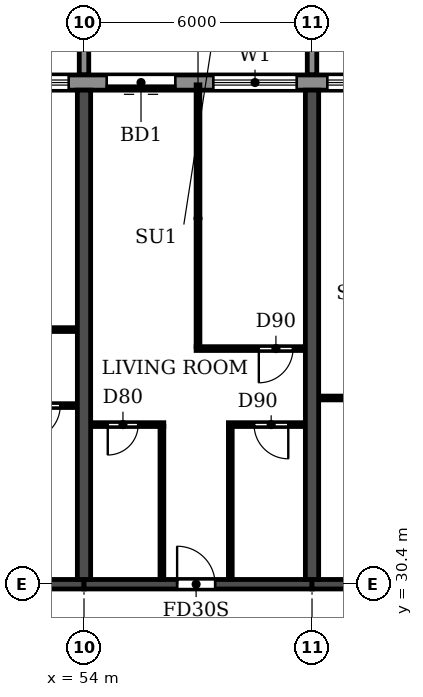
"""IFC4 building model, lengths in metres.
Left out: names, types, materials, properties, quantities, classifications, styles, units other than length and angle.
Written with IfcOpenShell. Run it as: python <this file> out.ifc"""

import sys

from ifc_helpers import new_model, si_unit, direction, frame, frame_2d, origin, place, context, subcontext, project, spatial, polyline, rectangle, outline, extrude, source, transform, mapped, element, fill, save


model = new_model("IFC4")
c1 = context("Model", 3, precision=1e-05, world=origin(), true_north=direction((0.0, 1.0)))
c2 = subcontext(c1, "Body", "Model", "MODEL_VIEW")
j1 = project(units=[si_unit("LENGTHUNIT", "METRE"), si_unit("PLANEANGLEUNIT", "RADIAN")], contexts=[c1])
p1 = place(None, origin())
s1 = spatial("IfcSite", under=j1, at=p1, CompositionType="ELEMENT")
p2 = place(p1, origin())
s2 = spatial("IfcBuilding", under=s1, at=p2, CompositionType="ELEMENT")
p3 = place(p2, frame((0.0, 0.0, 112.5)))
s3 = spatial("IfcBuildingStorey", under=s2, at=p3, CompositionType="ELEMENT", Elevation=112.5)
for number, where, z_axis, x_axis in (
    (1, (54.0, 30.525, 0.0), (0.0, 0.0, 1.0), (0.0, 1.0, 0.0)),
    (2, (60.0, 30.525, 0.0), (0.0, 0.0, 1.0), (0.0, 1.0, 0.0)),
):
    element("IfcWall", number, at=place(p3, frame(where, z_axis=z_axis, x_axis=x_axis)), inside=s3, PredefinedType="SHEAR", context=c2, shape_type="SweptSolid", body=[
        extrude(rectangle(XDim=12.875, YDim=0.35, at=frame_2d((6.438, 0.0))), origin(), (0.0, 0.0, 1.0), 2.95),
    ])
p4 = place(p3, frame((48.0, 30.4, 0.0), z_axis=(0.0, 0.0, 1.0), x_axis=(1.0, 0.0, 0.0)))
e3 = element("IfcWall", 3, at=p4, inside=s3, PredefinedType="SHEAR", context=c2, shape_type="SweptSolid", body=[
    extrude(rectangle(XDim=6.0, YDim=0.25, at=frame_2d((3.0, 0.0))), origin(), (0.0, 0.0, 1.0), 2.35),
])
p5 = place(p4, frame((2.45, 0.0, 0.0)))
e4 = element("IfcOpeningElement", 4, at=p5, cuts=e3, PredefinedType="OPENING", context=c2, shape_type="SweptSolid", body=[
    extrude(rectangle(XDim=1.0, YDim=2.1, at=frame_2d((0.5, 1.05))), frame((0.0, 0.135, 0.0), z_axis=(0.0, -1.0, 0.0), x_axis=(1.0, 0.0, 0.0)), (0.0, 0.0, 1.0), 0.27),
])
p6 = place(p3, frame((54.0, 30.4, 0.0), z_axis=(0.0, 0.0, 1.0), x_axis=(1.0, 0.0, 0.0)))
e5 = element("IfcWall", 5, at=p6, inside=s3, PredefinedType="SHEAR", context=c2, shape_type="SweptSolid", body=[
    extrude(rectangle(XDim=6.0, YDim=0.25, at=frame_2d((3.0, 0.0))), origin(), (0.0, 0.0, 1.0), 2.35),
])
p7 = place(p6, frame((2.45, 0.0, 0.0)))
e6 = element("IfcOpeningElement", 6, at=p7, cuts=e5, PredefinedType="OPENING", context=c2, shape_type="SweptSolid", body=[
    extrude(rectangle(XDim=1.0, YDim=2.1, at=frame_2d((0.5, 1.05))), frame((0.0, 0.135, 0.0), z_axis=(0.0, -1.0, 0.0), x_axis=(1.0, 0.0, 0.0)), (0.0, 0.0, 1.0), 0.27),
])
p8 = place(p3, frame((60.0, 30.4, 0.0), z_axis=(0.0, 0.0, 1.0), x_axis=(1.0, 0.0, 0.0)))
e7 = element("IfcWall", 7, at=p8, inside=s3, PredefinedType="SHEAR", context=c2, shape_type="SweptSolid", body=[
    extrude(rectangle(XDim=6.0, YDim=0.25, at=frame_2d((3.0, 0.0))), origin(), (0.0, 0.0, 1.0), 2.35),
])
p9 = place(p8, frame((2.45, 0.0, 0.0)))
e8 = element("IfcOpeningElement", 8, at=p9, cuts=e7, PredefinedType="OPENING", context=c2, shape_type="SweptSolid", body=[
    extrude(rectangle(XDim=1.0, YDim=2.1, at=frame_2d((0.5, 1.05))), frame((0.0, 0.135, 0.0), z_axis=(0.0, -1.0, 0.0), x_axis=(1.0, 0.0, 0.0)), (0.0, 0.0, 1.0), 0.27),
])
p10 = place(p3, frame((85.317, 43.6, 0.0), z_axis=(0.0, 0.0, 1.0), x_axis=(-1.0, 0.0, 0.0)))
e9 = element("IfcWall", 9, at=p10, inside=s3, PredefinedType="STANDARD", context=c2, shape_type="SweptSolid", body=[
    extrude(rectangle(XDim=68.634, YDim=0.4, at=frame_2d((34.317, 0.0))), origin(), (0.0, 0.0, 1.0), 2.95),
])
p11 = place(p10, frame((64.917, 0.0, 0.0)))
e10 = element("IfcOpeningElement", 10, at=p11, cuts=e9, PredefinedType="OPENING", context=c2, shape_type="SweptSolid", body=[
    extrude(rectangle(XDim=1.8, YDim=2.4, at=frame_2d((0.9, 1.2))), frame((0.0, 0.21, 0.0), z_axis=(0.0, -1.0, 0.0), x_axis=(1.0, 0.0, 0.0)), (0.0, 0.0, 1.0), 0.42),
])
p12 = place(p10, frame((61.717, 0.0, 0.9)))
e11 = element("IfcOpeningElement", 11, at=p12, cuts=e9, PredefinedType="OPENING", context=c2, shape_type="SweptSolid", body=[
    extrude(rectangle(XDim=2.2, YDim=1.5, at=frame_2d((1.1, 0.75))), frame((0.0, 0.21, 0.0), z_axis=(0.0, -1.0, 0.0), x_axis=(1.0, 0.0, 0.0)), (0.0, 0.0, 1.0), 0.42),
])
p13 = place(p10, frame((58.717, 0.0, 0.9)))
e12 = element("IfcOpeningElement", 12, at=p13, cuts=e9, PredefinedType="OPENING", context=c2, shape_type="SweptSolid", body=[
    extrude(rectangle(XDim=2.2, YDim=1.5, at=frame_2d((1.1, 0.75))), frame((0.0, 0.21, 0.0), z_axis=(0.0, -1.0, 0.0), x_axis=(1.0, 0.0, 0.0)), (0.0, 0.0, 1.0), 0.42),
])
p14 = place(p10, frame((55.917, 0.0, 0.0)))
e13 = element("IfcOpeningElement", 13, at=p14, cuts=e9, PredefinedType="OPENING", context=c2, shape_type="SweptSolid", body=[
    extrude(rectangle(XDim=1.8, YDim=2.4, at=frame_2d((0.9, 1.2))), frame((0.0, 0.21, 0.0), z_axis=(0.0, -1.0, 0.0), x_axis=(1.0, 0.0, 0.0)), (0.0, 0.0, 1.0), 0.42),
])
p15 = place(p10, frame((52.917, 0.0, 0.0)))
e14 = element("IfcOpeningElement", 14, at=p15, cuts=e9, PredefinedType="OPENING", context=c2, shape_type="SweptSolid", body=[
    extrude(rectangle(XDim=1.8, YDim=2.4, at=frame_2d((0.9, 1.2))), frame((0.0, 0.21, 0.0), z_axis=(0.0, -1.0, 0.0), x_axis=(1.0, 0.0, 0.0)), (0.0, 0.0, 1.0), 0.42),
])
p16 = place(p10, frame((49.717, 0.0, 0.9)))
e15 = element("IfcOpeningElement", 15, at=p16, cuts=e9, PredefinedType="OPENING", context=c2, shape_type="SweptSolid", body=[
    extrude(rectangle(XDim=2.2, YDim=1.5, at=frame_2d((1.1, 0.75))), frame((0.0, 0.21, 0.0), z_axis=(0.0, -1.0, 0.0), x_axis=(1.0, 0.0, 0.0)), (0.0, 0.0, 1.0), 0.42),
])
p17 = place(p10, frame((46.717, 0.0, 0.9)))
e16 = element("IfcOpeningElement", 16, at=p17, cuts=e9, PredefinedType="OPENING", context=c2, shape_type="SweptSolid", body=[
    extrude(rectangle(XDim=2.2, YDim=1.5, at=frame_2d((1.1, 0.75))), frame((0.0, 0.21, 0.0), z_axis=(0.0, -1.0, 0.0), x_axis=(1.0, 0.0, 0.0)), (0.0, 0.0, 1.0), 0.42),
])
p18 = place(p10, frame((43.917, 0.0, 0.0)))
e17 = element("IfcOpeningElement", 17, at=p18, cuts=e9, PredefinedType="OPENING", context=c2, shape_type="SweptSolid", body=[
    extrude(rectangle(XDim=1.8, YDim=2.4, at=frame_2d((0.9, 1.2))), frame((0.0, 0.21, 0.0), z_axis=(0.0, -1.0, 0.0), x_axis=(1.0, 0.0, 0.0)), (0.0, 0.0, 1.0), 0.42),
])
p19 = place(p10, frame((40.717, 0.0, 0.9)))
e18 = element("IfcOpeningElement", 18, at=p19, cuts=e9, PredefinedType="OPENING", context=c2, shape_type="SweptSolid", body=[
    extrude(rectangle(XDim=2.2, YDim=1.5, at=frame_2d((1.1, 0.75))), frame((0.0, 0.21, 0.0), z_axis=(0.0, -1.0, 0.0), x_axis=(1.0, 0.0, 0.0)), (0.0, 0.0, 1.0), 0.42),
])
p20 = place(p10, frame((37.717, 0.0, 0.9)))
e19 = element("IfcOpeningElement", 19, at=p20, cuts=e9, PredefinedType="OPENING", context=c2, shape_type="SweptSolid", body=[
    extrude(rectangle(XDim=2.2, YDim=1.5, at=frame_2d((1.1, 0.75))), frame((0.0, 0.21, 0.0), z_axis=(0.0, -1.0, 0.0), x_axis=(1.0, 0.0, 0.0)), (0.0, 0.0, 1.0), 0.42),
])
p21 = place(p10, frame((34.917, 0.0, 0.0)))
e20 = element("IfcOpeningElement", 20, at=p21, cuts=e9, PredefinedType="OPENING", context=c2, shape_type="SweptSolid", body=[
    extrude(rectangle(XDim=1.8, YDim=2.4, at=frame_2d((0.9, 1.2))), frame((0.0, 0.21, 0.0), z_axis=(0.0, -1.0, 0.0), x_axis=(1.0, 0.0, 0.0)), (0.0, 0.0, 1.0), 0.42),
])
p22 = place(p10, frame((31.717, 0.0, 0.9)))
e21 = element("IfcOpeningElement", 21, at=p22, cuts=e9, PredefinedType="OPENING", context=c2, shape_type="SweptSolid", body=[
    extrude(rectangle(XDim=2.2, YDim=1.5, at=frame_2d((1.1, 0.75))), frame((0.0, 0.21, 0.0), z_axis=(0.0, -1.0, 0.0), x_axis=(1.0, 0.0, 0.0)), (0.0, 0.0, 1.0), 0.42),
])
p23 = place(p10, frame((28.917, 0.0, 0.0)))
e22 = element("IfcOpeningElement", 22, at=p23, cuts=e9, PredefinedType="OPENING", context=c2, shape_type="SweptSolid", body=[
    extrude(rectangle(XDim=1.8, YDim=2.4, at=frame_2d((0.9, 1.2))), frame((0.0, 0.21, 0.0), z_axis=(0.0, -1.0, 0.0), x_axis=(1.0, 0.0, 0.0)), (0.0, 0.0, 1.0), 0.42),
])
p24 = place(p10, frame((25.717, 0.0, 0.9)))
e23 = element("IfcOpeningElement", 23, at=p24, cuts=e9, PredefinedType="OPENING", context=c2, shape_type="SweptSolid", body=[
    extrude(rectangle(XDim=2.2, YDim=1.5, at=frame_2d((1.1, 0.75))), frame((0.0, 0.21, 0.0), z_axis=(0.0, -1.0, 0.0), x_axis=(1.0, 0.0, 0.0)), (0.0, 0.0, 1.0), 0.42),
])
p25 = place(p10, frame((22.717, 0.0, 0.9)))
e24 = element("IfcOpeningElement", 24, at=p25, cuts=e9, PredefinedType="OPENING", context=c2, shape_type="SweptSolid", body=[
    extrude(rectangle(XDim=2.2, YDim=1.5, at=frame_2d((1.1, 0.75))), frame((0.0, 0.21, 0.0), z_axis=(0.0, -1.0, 0.0), x_axis=(1.0, 0.0, 0.0)), (0.0, 0.0, 1.0), 0.42),
])
p26 = place(p10, frame((19.917, 0.0, 0.0)))
e25 = element("IfcOpeningElement", 25, at=p26, cuts=e9, PredefinedType="OPENING", context=c2, shape_type="SweptSolid", body=[
    extrude(rectangle(XDim=1.8, YDim=2.4, at=frame_2d((0.9, 1.2))), frame((0.0, 0.21, 0.0), z_axis=(0.0, -1.0, 0.0), x_axis=(1.0, 0.0, 0.0)), (0.0, 0.0, 1.0), 0.42),
])
p27 = place(p10, frame((16.717, 0.0, 0.9)))
e26 = element("IfcOpeningElement", 26, at=p27, cuts=e9, PredefinedType="OPENING", context=c2, shape_type="SweptSolid", body=[
    extrude(rectangle(XDim=2.2, YDim=1.5, at=frame_2d((1.1, 0.75))), frame((0.0, 0.21, 0.0), z_axis=(0.0, -1.0, 0.0), x_axis=(1.0, 0.0, 0.0)), (0.0, 0.0, 1.0), 0.42),
])
p28 = place(p10, frame((13.917, 0.0, 0.0)))
e27 = element("IfcOpeningElement", 27, at=p28, cuts=e9, PredefinedType="OPENING", context=c2, shape_type="SweptSolid", body=[
    extrude(rectangle(XDim=1.8, YDim=2.4, at=frame_2d((0.9, 1.2))), frame((0.0, 0.21, 0.0), z_axis=(0.0, -1.0, 0.0), x_axis=(1.0, 0.0, 0.0)), (0.0, 0.0, 1.0), 0.42),
])
p29 = place(p10, frame((10.717, 0.0, 0.9)))
e28 = element("IfcOpeningElement", 28, at=p29, cuts=e9, PredefinedType="OPENING", context=c2, shape_type="SweptSolid", body=[
    extrude(rectangle(XDim=2.2, YDim=1.5, at=frame_2d((1.1, 0.75))), frame((0.0, 0.21, 0.0), z_axis=(0.0, -1.0, 0.0), x_axis=(1.0, 0.0, 0.0)), (0.0, 0.0, 1.0), 0.42),
])
p30 = place(p10, frame((7.717, 0.0, 0.9)))
e29 = element("IfcOpeningElement", 29, at=p30, cuts=e9, PredefinedType="OPENING", context=c2, shape_type="SweptSolid", body=[
    extrude(rectangle(XDim=2.2, YDim=1.5, at=frame_2d((1.1, 0.75))), frame((0.0, 0.21, 0.0), z_axis=(0.0, -1.0, 0.0), x_axis=(1.0, 0.0, 0.0)), (0.0, 0.0, 1.0), 0.42),
])
p31 = place(p10, frame((4.917, 0.0, 0.0)))
e30 = element("IfcOpeningElement", 30, at=p31, cuts=e9, PredefinedType="OPENING", context=c2, shape_type="SweptSolid", body=[
    extrude(rectangle(XDim=1.8, YDim=2.4, at=frame_2d((0.9, 1.2))), frame((0.0, 0.21, 0.0), z_axis=(0.0, -1.0, 0.0), x_axis=(1.0, 0.0, 0.0)), (0.0, 0.0, 1.0), 0.42),
])
p32 = place(p10, frame((1.717, 0.0, 0.9)))
e31 = element("IfcOpeningElement", 31, at=p32, cuts=e9, PredefinedType="OPENING", context=c2, shape_type="SweptSolid", body=[
    extrude(rectangle(XDim=2.2, YDim=1.5, at=frame_2d((1.1, 0.75))), frame((0.0, 0.21, 0.0), z_axis=(0.0, -1.0, 0.0), x_axis=(1.0, 0.0, 0.0)), (0.0, 0.0, 1.0), 0.42),
])
m1 = source(origin(), c2, "Body", "SweptSolid", [
    extrude(outline(polyline([(0.0, 0.0), (0.25, 0.0), (0.25, 3.1), (0.0, 3.1), (0.0, 0.0)])), origin(), (0.0, 0.0, 1.0), 3.1),
])
for number, where in (
    (32, (53.875, 43.8, 0.0)),
    (33, (59.875, 43.8, 0.0)),
):
    element("IfcWall", number, at=place(p3, frame(where)), inside=s3, PredefinedType="STANDARD", context=c2, shape_type="MappedRepresentation", body=[
        mapped(m1, transform((0.0, 0.0, 0.0))),
    ])
p33 = place(p3, frame((54.185, 34.6, 0.0), z_axis=(0.0, 0.0, 1.0), x_axis=(1.0, 0.0, 0.0)))
e34 = element("IfcWall", 34, at=p33, inside=s3, PredefinedType="PARTITIONING", context=c2, shape_type="SweptSolid", body=[
    extrude(rectangle(XDim=1.915, YDim=0.1, at=frame_2d((0.958, 0.0))), origin(), (0.0, 0.0, 1.0), 2.95),
])
p34 = place(p33, frame((0.44, 0.0, 0.0)))
e35 = element("IfcOpeningElement", 35, at=p34, cuts=e34, PredefinedType="OPENING", context=c2, shape_type="SweptSolid", body=[
    extrude(rectangle(XDim=0.8, YDim=2.1, at=frame_2d((0.4, 1.05))), frame((0.0, 0.06, 0.0), z_axis=(0.0, -1.0, 0.0), x_axis=(1.0, 0.0, 0.0)), (0.0, 0.0, 1.0), 0.12),
])
p35 = place(p3, frame((57.8, 34.6, 0.0), z_axis=(0.0, 0.0, 1.0), x_axis=(1.0, 0.0, 0.0)))
e36 = element("IfcWall", 36, at=p35, inside=s3, PredefinedType="PARTITIONING", context=c2, shape_type="SweptSolid", body=[
    extrude(rectangle(XDim=2.015, YDim=0.1, at=frame_2d((1.007, 0.0))), origin(), (0.0, 0.0, 1.0), 2.95),
])
p36 = place(p35, frame((0.675, 0.0, 0.0)))
e37 = element("IfcOpeningElement", 37, at=p36, cuts=e36, PredefinedType="OPENING", context=c2, shape_type="SweptSolid", body=[
    extrude(rectangle(XDim=0.9, YDim=2.1, at=frame_2d((0.45, 1.05))), frame((0.0, 0.06, 0.0), z_axis=(0.0, -1.0, 0.0), x_axis=(1.0, 0.0, 0.0)), (0.0, 0.0, 1.0), 0.12),
])
p37 = place(p3, frame((51.8, 35.1, 0.0), z_axis=(0.0, 0.0, 1.0), x_axis=(1.0, 0.0, 0.0)))
e38 = element("IfcWall", 38, at=p37, inside=s3, PredefinedType="PARTITIONING", context=c2, shape_type="SweptSolid", body=[
    extrude(rectangle(XDim=2.015, YDim=0.1, at=frame_2d((1.007, 0.0))), origin(), (0.0, 0.0, 1.0), 2.95),
])
p38 = place(p37, frame((0.675, 0.0, 0.0)))
e39 = element("IfcOpeningElement", 39, at=p38, cuts=e38, PredefinedType="OPENING", context=c2, shape_type="SweptSolid", body=[
    extrude(rectangle(XDim=0.9, YDim=2.1, at=frame_2d((0.45, 1.05))), frame((0.0, 0.06, 0.0), z_axis=(0.0, -1.0, 0.0), x_axis=(1.0, 0.0, 0.0)), (0.0, 0.0, 1.0), 0.12),
])
p39 = place(p3, frame((60.185, 35.3, 0.0), z_axis=(0.0, 0.0, 1.0), x_axis=(1.0, 0.0, 0.0)))
e40 = element("IfcWall", 40, at=p39, inside=s3, PredefinedType="PARTITIONING", context=c2, shape_type="SweptSolid", body=[
    extrude(rectangle(XDim=1.915, YDim=0.1, at=frame_2d((0.958, 0.0))), origin(), (0.0, 0.0, 1.0), 2.95),
])
p40 = place(p3, frame((56.95, 36.6, 0.0), z_axis=(0.0, 0.0, 1.0), x_axis=(1.0, 0.0, 0.0)))
e41 = element("IfcWall", 41, at=p40, inside=s3, PredefinedType="PARTITIONING", context=c2, shape_type="SweptSolid", body=[
    extrude(rectangle(XDim=2.865, YDim=0.1, at=frame_2d((1.433, 0.0))), origin(), (0.0, 0.0, 1.0), 2.95),
])
p41 = place(p40, frame((1.65, 0.0, 0.0)))
e42 = element("IfcOpeningElement", 42, at=p41, cuts=e41, PredefinedType="OPENING", context=c2, shape_type="SweptSolid", body=[
    extrude(rectangle(XDim=0.9, YDim=2.1, at=frame_2d((0.45, 1.05))), frame((0.0, 0.06, 0.0), z_axis=(0.0, -1.0, 0.0), x_axis=(1.0, 0.0, 0.0)), (0.0, 0.0, 1.0), 0.12),
])
p42 = place(p3, frame((50.95, 37.1, 0.0), z_axis=(0.0, 0.0, 1.0), x_axis=(1.0, 0.0, 0.0)))
e43 = element("IfcWall", 43, at=p42, inside=s3, PredefinedType="PARTITIONING", context=c2, shape_type="SweptSolid", body=[
    extrude(rectangle(XDim=2.865, YDim=0.1, at=frame_2d((1.433, 0.0))), origin(), (0.0, 0.0, 1.0), 2.95),
])
p43 = place(p42, frame((0.55, 0.0, 0.0)))
e44 = element("IfcOpeningElement", 44, at=p43, cuts=e43, PredefinedType="OPENING", context=c2, shape_type="SweptSolid", body=[
    extrude(rectangle(XDim=0.9, YDim=2.1, at=frame_2d((0.45, 1.05))), frame((0.0, 0.06, 0.0), z_axis=(0.0, -1.0, 0.0), x_axis=(1.0, 0.0, 0.0)), (0.0, 0.0, 1.0), 0.12),
])
p44 = place(p3, frame((56.05, 30.535, 0.0), z_axis=(0.0, 0.0, 1.0), x_axis=(0.0, 1.0, 0.0)))
e45 = element("IfcWall", 45, at=p44, inside=s3, PredefinedType="PARTITIONING", context=c2, shape_type="SweptSolid", body=[
    extrude(rectangle(XDim=4.015, YDim=0.1, at=frame_2d((2.008, 0.0))), origin(), (0.0, 0.0, 1.0), 2.95),
])
p45 = place(p3, frame((57.0, 36.65, 0.0), z_axis=(0.0, 0.0, 1.0), x_axis=(0.0, 1.0, 0.0)))
e46 = element("IfcWall", 46, at=p45, inside=s3, PredefinedType="PARTITIONING", context=c2, shape_type="SweptSolid", body=[
    extrude(rectangle(XDim=6.89, YDim=0.1, at=frame_2d((3.445, 0.0))), origin(), (0.0, 0.0, 1.0), 2.95),
])
p46 = place(p3, frame((57.85, 30.535, 0.0), z_axis=(0.0, 0.0, 1.0), x_axis=(0.0, 1.0, 0.0)))
e47 = element("IfcWall", 47, at=p46, inside=s3, PredefinedType="PARTITIONING", context=c2, shape_type="SweptSolid", body=[
    extrude(rectangle(XDim=4.015, YDim=0.1, at=frame_2d((2.008, 0.0))), origin(), (0.0, 0.0, 1.0), 2.95),
])
p47 = place(p22, origin())
e48 = element("IfcWindow", 48, at=p47, inside=s3, PartitioningType="DOUBLE_PANEL_HORIZONTAL", PredefinedType="WINDOW", context=c2, shape_type="SweptSolid", body=[
    extrude(rectangle(XDim=2.2, YDim=1.5, at=frame_2d((1.1, 0.75))), frame((0.0, 0.03, 0.0), z_axis=(0.0, -1.0, 0.0), x_axis=(1.0, 0.0, 0.0)), (0.0, 0.0, 1.0), 0.06),
])
fill(e21, e48)
p48 = place(p23, origin())
e49 = element("IfcDoor", 49, at=p48, inside=s3, OperationType="DOUBLE_DOOR_SLIDING", PredefinedType="DOOR", context=c2, shape_type="SweptSolid", body=[
    extrude(rectangle(XDim=1.8, YDim=2.4, at=frame_2d((0.9, 1.2))), frame((0.0, 0.025, 0.0), z_axis=(0.0, -1.0, 0.0), x_axis=(1.0, 0.0, 0.0)), (0.0, 0.0, 1.0), 0.05),
])
fill(e22, e49)
p49 = place(p24, origin())
e50 = element("IfcWindow", 50, at=p49, inside=s3, PartitioningType="DOUBLE_PANEL_HORIZONTAL", PredefinedType="WINDOW", context=c2, shape_type="SweptSolid", body=[
    extrude(rectangle(XDim=2.2, YDim=1.5, at=frame_2d((1.1, 0.75))), frame((0.0, 0.03, 0.0), z_axis=(0.0, -1.0, 0.0), x_axis=(1.0, 0.0, 0.0)), (0.0, 0.0, 1.0), 0.06),
])
fill(e23, e50)
p50 = place(p25, origin())
e51 = element("IfcWindow", 51, at=p50, inside=s3, PartitioningType="DOUBLE_PANEL_HORIZONTAL", PredefinedType="WINDOW", context=c2, shape_type="SweptSolid", body=[
    extrude(rectangle(XDim=2.2, YDim=1.5, at=frame_2d((1.1, 0.75))), frame((0.0, 0.03, 0.0), z_axis=(0.0, -1.0, 0.0), x_axis=(1.0, 0.0, 0.0)), (0.0, 0.0, 1.0), 0.06),
])
fill(e24, e51)
p51 = place(p38, frame((0.9, 0.0, 0.0), z_axis=(0.0, 0.0, 1.0), x_axis=(-1.0, 0.0, 0.0)))
e52 = element("IfcDoor", 52, at=p51, inside=s3, OperationType="SINGLE_SWING_RIGHT", PredefinedType="DOOR", context=c2, shape_type="SweptSolid", body=[
    extrude(rectangle(XDim=0.9, YDim=2.1, at=frame_2d((0.45, 1.05))), frame((0.0, 0.025, 0.0), z_axis=(0.0, -1.0, 0.0), x_axis=(1.0, 0.0, 0.0)), (0.0, 0.0, 1.0), 0.05),
])
fill(e39, e52)
p52 = place(p34, frame((0.8, 0.0, 0.0), z_axis=(0.0, 0.0, 1.0), x_axis=(-1.0, 0.0, 0.0)))
e53 = element("IfcDoor", 53, at=p52, inside=s3, OperationType="SINGLE_SWING_RIGHT", PredefinedType="DOOR", context=c2, shape_type="SweptSolid", body=[
    extrude(rectangle(XDim=0.8, YDim=2.1, at=frame_2d((0.4, 1.05))), frame((0.0, 0.025, 0.0), z_axis=(0.0, -1.0, 0.0), x_axis=(1.0, 0.0, 0.0)), (0.0, 0.0, 1.0), 0.05),
])
fill(e35, e53)
p53 = place(p7, origin())
e54 = element("IfcDoor", 54, at=p53, inside=s3, OperationType="SINGLE_SWING_LEFT", PredefinedType="DOOR", context=c2, shape_type="SweptSolid", body=[
    extrude(rectangle(XDim=1.0, YDim=2.1, at=frame_2d((0.5, 1.05))), frame((0.0, 0.025, 0.0), z_axis=(0.0, -1.0, 0.0), x_axis=(1.0, 0.0, 0.0)), (0.0, 0.0, 1.0), 0.05),
])
fill(e6, e54)
p54 = place(p36, frame((0.9, 0.0, 0.0), z_axis=(0.0, 0.0, 1.0), x_axis=(-1.0, 0.0, 0.0)))
e55 = element("IfcDoor", 55, at=p54, inside=s3, OperationType="SINGLE_SWING_LEFT", PredefinedType="DOOR", context=c2, shape_type="SweptSolid", body=[
    extrude(rectangle(XDim=0.9, YDim=2.1, at=frame_2d((0.45, 1.05))), frame((0.0, 0.025, 0.0), z_axis=(0.0, -1.0, 0.0), x_axis=(1.0, 0.0, 0.0)), (0.0, 0.0, 1.0), 0.05),
])
fill(e37, e55)
p55 = place(p41, frame((0.9, 0.0, 0.0), z_axis=(0.0, 0.0, 1.0), x_axis=(-1.0, 0.0, 0.0)))
e56 = element("IfcDoor", 56, at=p55, inside=s3, OperationType="SINGLE_SWING_RIGHT", PredefinedType="DOOR", context=c2, shape_type="SweptSolid", body=[
    extrude(rectangle(XDim=0.9, YDim=2.1, at=frame_2d((0.45, 1.05))), frame((0.0, 0.025, 0.0), z_axis=(0.0, -1.0, 0.0), x_axis=(1.0, 0.0, 0.0)), (0.0, 0.0, 1.0), 0.05),
])
fill(e42, e56)
save(model, sys.argv[1])
